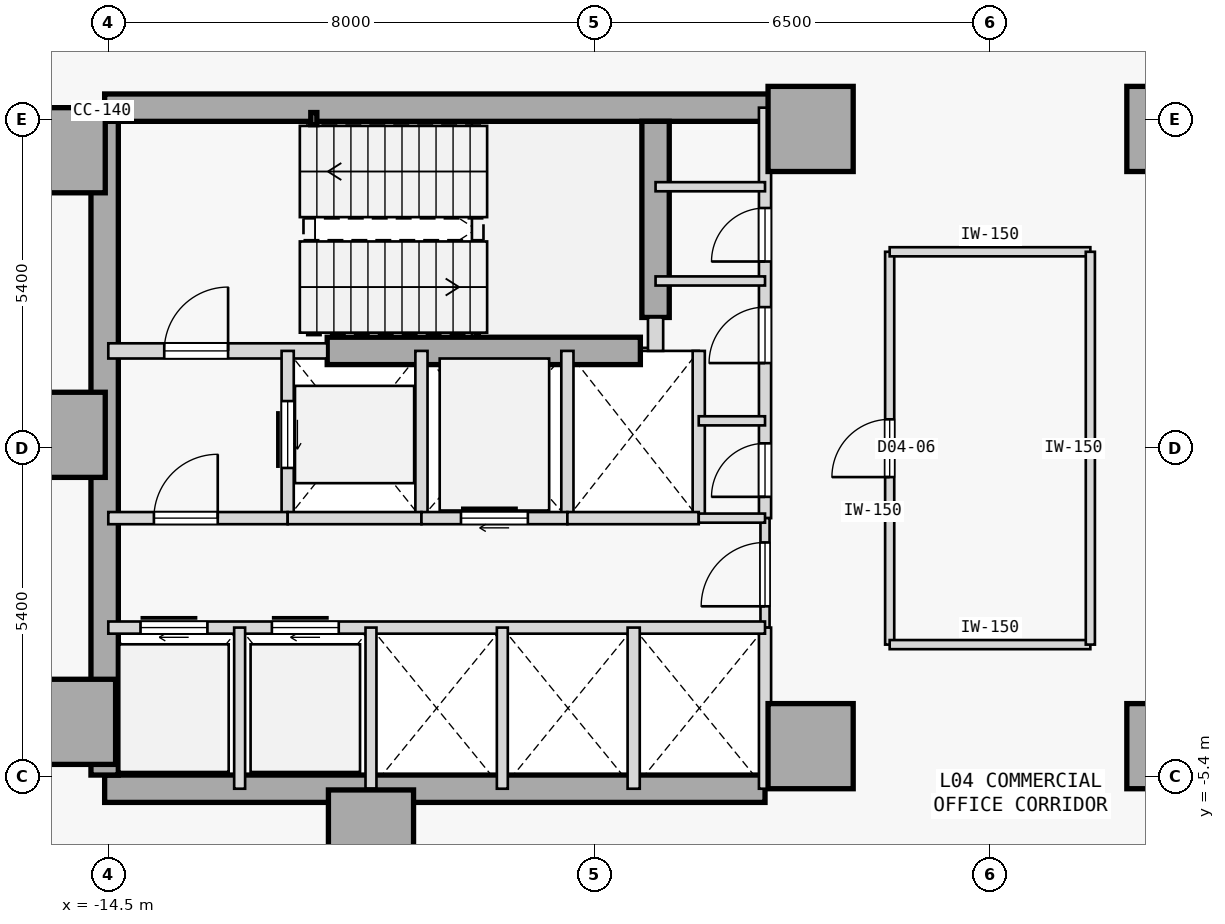
"""IFC4 building model, lengths in metres.
Left out: names, types, materials, properties, quantities, classifications, styles, units other than length and angle.
Written with IfcOpenShell. Run it as: python <this file> out.ifc"""

import sys

from ifc_helpers import new_model, si_unit, direction, frame, frame_2d, origin, origin_2d, place, context, subcontext, project, spatial, rectangle, hollow_rectangle, extrude, element, fill, save


model = new_model("IFC4")
c1 = context("Model", 3, precision=1e-05, world=origin(), true_north=direction((0.0, 1.0)))
c2 = subcontext(c1, "Body", "Model", "MODEL_VIEW")
j1 = project(units=[si_unit("LENGTHUNIT", "METRE"), si_unit("PLANEANGLEUNIT", "RADIAN")], contexts=[c1])
p1 = place(None, origin())
s1 = spatial("IfcSite", under=j1, at=p1, CompositionType="ELEMENT")
p2 = place(p1, origin())
s2 = spatial("IfcBuilding", under=s1, at=p2, CompositionType="ELEMENT")
p3 = place(p2, frame((0.0, 0.0, 21.8)))
s3 = spatial("IfcBuildingStorey", under=s2, at=p3, CompositionType="ELEMENT", Elevation=21.8)
for number, where, z_axis, x_axis in (
    (1, (-15.25, 4.9, 0.0), (0.0, 0.0, 1.0), (1.0, 0.0, 0.0)),
    (2, (-15.25, 0.22, 0.0), (0.0, 0.0, 1.0), (1.0, 0.0, 0.0)),
    (3, (-15.08, -4.5, 0.0), (0.0, 0.0, 1.0), (1.0, 0.0, 0.0)),
    (4, (-10.18, -6.32, 0.0), (0.0, 0.0, 1.0), (1.0, 0.0, 0.0)),
    (5, (-2.95, -4.9, 0.0), (0.0, 0.0, 1.0), (1.0, 0.0, 0.0)),
    (6, (-2.95, 5.25, 0.0), (0.0, 0.0, 1.0), (1.0, 0.0, 0.0)),
    (7, (2.95, -4.9, 0.0), (0.0, 0.0, 1.0), (1.0, 0.0, 0.0)),
    (8, (2.95, 5.25, 0.0), (0.0, 0.0, 1.0), (1.0, 0.0, 0.0)),
):
    element("IfcColumn", number, at=place(p3, frame(where, z_axis=z_axis, x_axis=x_axis)), inside=s3, PredefinedType="COLUMN", context=c2, shape_type="SweptSolid", body=[
        extrude(rectangle(XDim=1.4, YDim=1.4, at=origin_2d()), origin(), (0.0, 0.0, 1.0), 3.8),
    ])
p4 = place(p3, frame((-14.56, 5.6, 0.0), z_axis=(0.0, 0.0, 1.0), x_axis=(1.0, 0.0, 0.0)))
e9 = element("IfcWall", 9, at=p4, inside=s3, PredefinedType="SHEAR", context=c2, shape_type="SweptSolid", body=[
    extrude(rectangle(XDim=11.41, YDim=0.45, at=frame_2d((5.705, 0.0))), origin(), (0.0, 0.0, 1.0), 3.575),
])
p5 = place(p3, frame((-14.56, -5.6, 0.0), z_axis=(0.0, 0.0, 1.0), x_axis=(1.0, 0.0, 0.0)))
e10 = element("IfcWall", 10, at=p5, inside=s3, PredefinedType="SHEAR", context=c2, shape_type="SweptSolid", body=[
    extrude(rectangle(XDim=10.86, YDim=0.45, at=frame_2d((5.43, 0.0))), origin(), (0.0, 0.0, 1.0), 3.575),
])
p6 = place(p3, frame((-14.56, -5.375, 0.0), z_axis=(0.0, 0.0, 1.0), x_axis=(0.0, 1.0, 0.0)))
e11 = element("IfcWall", 11, at=p6, inside=s3, PredefinedType="SHEAR", context=c2, shape_type="SweptSolid", body=[
    extrude(rectangle(XDim=10.75, YDim=0.45, at=frame_2d((5.375, 0.0))), origin(), (0.0, 0.0, 1.0), 3.575),
])
p7 = place(p3, frame((-5.5, 2.15, 0.0), z_axis=(0.0, 0.0, 1.0), x_axis=(0.0, 1.0, 0.0)))
e12 = element("IfcWall", 12, at=p7, inside=s3, PredefinedType="SHEAR", context=c2, shape_type="SweptSolid", body=[
    extrude(rectangle(XDim=3.225, YDim=0.45, at=frame_2d((1.613, 0.0))), origin(), (0.0, 0.0, 1.0), 3.575),
])
p8 = place(p3, frame((-10.9, 1.6, 0.0), z_axis=(0.0, 0.0, 1.0), x_axis=(1.0, 0.0, 0.0)))
e13 = element("IfcWall", 13, at=p8, inside=s3, PredefinedType="SHEAR", context=c2, shape_type="SweptSolid", body=[
    extrude(rectangle(XDim=5.15, YDim=0.45, at=frame_2d((2.575, 0.0))), origin(), (0.0, 0.0, 1.0), 3.575),
])
p9 = place(p3, frame((-11.12, 5.42, 0.0), z_axis=(0.0, 0.0, 1.0), x_axis=(1.0, 0.0, 0.0)))
e14 = element("IfcColumn", 14, at=p9, inside=s3, PredefinedType="COLUMN", context=c2, shape_type="SweptSolid", body=[
    extrude(hollow_rectangle(XDim=0.1, YDim=0.2, WallThickness=0.008, at=origin_2d()), origin(), (0.0, 0.0, 1.0), 3.8),
])
p10 = place(p3, frame((-14.5, 1.6, 0.0), z_axis=(0.0, 0.0, 1.0), x_axis=(1.0, 0.0, 0.0)))
e15 = element("IfcWall", 15, at=p10, inside=s3, PredefinedType="STANDARD", context=c2, shape_type="SweptSolid", body=[
    extrude(rectangle(XDim=3.6, YDim=0.25, at=frame_2d((1.8, 0.0))), origin(), (0.0, 0.0, 1.0), 3.575),
])
p11 = place(p10, frame((0.92, 0.0, 0.0)))
e16 = element("IfcOpeningElement", 16, at=p11, cuts=e15, PredefinedType="OPENING", context=c2, shape_type="SweptSolid", body=[
    extrude(rectangle(XDim=1.05, YDim=2.15, at=frame_2d((0.525, 1.075))), frame((0.0, 0.135, 0.0), z_axis=(0.0, -1.0, 0.0), x_axis=(1.0, 0.0, 0.0)), (0.0, 0.0, 1.0), 0.27),
])
p12 = place(p3, frame((-5.5, 1.6, 0.0), z_axis=(0.0, 0.0, 1.0), x_axis=(0.0, 1.0, 0.0)))
e17 = element("IfcWall", 17, at=p12, inside=s3, PredefinedType="STANDARD", context=c2, shape_type="SweptSolid", body=[
    extrude(rectangle(XDim=0.55, YDim=0.25, at=frame_2d((0.275, 0.0))), origin(), (0.0, 0.0, 1.0), 3.575),
])
p13 = place(p3, frame((-3.7, -1.15, 0.0), z_axis=(0.0, 0.0, 1.0), x_axis=(0.0, 1.0, 0.0)))
e18 = element("IfcWall", 18, at=p13, inside=s3, PredefinedType="STANDARD", context=c2, shape_type="SweptSolid", body=[
    extrude(rectangle(XDim=6.75, YDim=0.2, at=frame_2d((3.375, 0.0))), origin(), (0.0, 0.0, 1.0), 3.575),
])
p14 = place(p13, frame((0.35, 0.0, 0.0)))
e19 = element("IfcOpeningElement", 19, at=p14, cuts=e18, PredefinedType="OPENING", context=c2, shape_type="SweptSolid", body=[
    extrude(rectangle(XDim=0.88, YDim=2.15, at=frame_2d((0.44, 1.075))), frame((0.0, 0.11, 0.0), z_axis=(0.0, -1.0, 0.0), x_axis=(1.0, 0.0, 0.0)), (0.0, 0.0, 1.0), 0.22),
])
p15 = place(p13, frame((2.55, 0.0, 0.0)))
e20 = element("IfcOpeningElement", 20, at=p15, cuts=e18, PredefinedType="OPENING", context=c2, shape_type="SweptSolid", body=[
    extrude(rectangle(XDim=0.92, YDim=2.15, at=frame_2d((0.46, 1.075))), frame((0.0, 0.11, 0.0), z_axis=(0.0, -1.0, 0.0), x_axis=(1.0, 0.0, 0.0)), (0.0, 0.0, 1.0), 0.22),
])
p16 = place(p13, frame((4.22, 0.0, 0.0)))
e21 = element("IfcOpeningElement", 21, at=p16, cuts=e18, PredefinedType="OPENING", context=c2, shape_type="SweptSolid", body=[
    extrude(rectangle(XDim=0.88, YDim=2.15, at=frame_2d((0.44, 1.075))), frame((0.0, 0.11, 0.0), z_axis=(0.0, -1.0, 0.0), x_axis=(1.0, 0.0, 0.0)), (0.0, 0.0, 1.0), 0.22),
])
p17 = place(p3, frame((-3.7, -2.95, 0.0), z_axis=(0.0, 0.0, 1.0), x_axis=(0.0, 1.0, 0.0)))
e22 = element("IfcWall", 22, at=p17, inside=s3, PredefinedType="PARTITIONING", context=c2, shape_type="SweptSolid", body=[
    extrude(rectangle(XDim=1.8, YDim=0.15, at=frame_2d((0.9, 0.0))), origin(), (0.0, 0.0, 1.0), 3.575),
])
p18 = place(p17, frame((0.35, 0.0, 0.0)))
e23 = element("IfcOpeningElement", 23, at=p18, cuts=e22, PredefinedType="OPENING", context=c2, shape_type="SweptSolid", body=[
    extrude(rectangle(XDim=1.05, YDim=2.18, at=frame_2d((0.525, 1.09))), frame((0.0, 0.085, 0.0), z_axis=(0.0, -1.0, 0.0), x_axis=(1.0, 0.0, 0.0)), (0.0, 0.0, 1.0), 0.17),
])
p19 = place(p3, frame((-3.7, -5.6, 0.0), z_axis=(0.0, 0.0, 1.0), x_axis=(0.0, 1.0, 0.0)))
e24 = element("IfcWall", 24, at=p19, inside=s3, PredefinedType="STANDARD", context=c2, shape_type="SweptSolid", body=[
    extrude(rectangle(XDim=2.65, YDim=0.2, at=frame_2d((1.325, 0.0))), origin(), (0.0, 0.0, 1.0), 3.575),
])
p20 = place(p3, frame((-11.55, -1.15, 0.0), z_axis=(0.0, 0.0, 1.0), x_axis=(0.0, 1.0, 0.0)))
e25 = element("IfcWall", 25, at=p20, inside=s3, PredefinedType="STANDARD", context=c2, shape_type="SweptSolid", body=[
    extrude(rectangle(XDim=2.75, YDim=0.2, at=frame_2d((1.375, 0.0))), origin(), (0.0, 0.0, 1.0), 3.575),
])
p21 = place(p20, frame((0.825, 0.0, 0.0)))
e26 = element("IfcOpeningElement", 26, at=p21, cuts=e25, PredefinedType="OPENING", context=c2, shape_type="SweptSolid", body=[
    extrude(rectangle(XDim=1.1, YDim=2.15, at=frame_2d((0.55, 1.075))), frame((0.0, 0.11, 0.0), z_axis=(0.0, -1.0, 0.0), x_axis=(1.0, 0.0, 0.0)), (0.0, 0.0, 1.0), 0.22),
])
p22 = place(p3, frame((-9.35, -1.15, 0.0), z_axis=(0.0, 0.0, 1.0), x_axis=(0.0, 1.0, 0.0)))
e27 = element("IfcWall", 27, at=p22, inside=s3, PredefinedType="STANDARD", context=c2, shape_type="SweptSolid", body=[
    extrude(rectangle(XDim=2.75, YDim=0.2, at=frame_2d((1.375, 0.0))), origin(), (0.0, 0.0, 1.0), 3.575),
])
p23 = place(p3, frame((-14.5, -1.15, 0.0), z_axis=(0.0, 0.0, 1.0), x_axis=(1.0, 0.0, 0.0)))
e28 = element("IfcWall", 28, at=p23, inside=s3, PredefinedType="STANDARD", context=c2, shape_type="SweptSolid", body=[
    extrude(rectangle(XDim=2.95, YDim=0.2, at=frame_2d((1.475, 0.0))), origin(), (0.0, 0.0, 1.0), 3.575),
])
p24 = place(p23, frame((0.75, 0.0, 0.0)))
e29 = element("IfcOpeningElement", 29, at=p24, cuts=e28, PredefinedType="OPENING", context=c2, shape_type="SweptSolid", body=[
    extrude(rectangle(XDim=1.05, YDim=2.18, at=frame_2d((0.525, 1.09))), frame((0.0, 0.11, 0.0), z_axis=(0.0, -1.0, 0.0), x_axis=(1.0, 0.0, 0.0)), (0.0, 0.0, 1.0), 0.22),
])
p25 = place(p3, frame((-11.55, -1.15, 0.0), z_axis=(0.0, 0.0, 1.0), x_axis=(1.0, 0.0, 0.0)))
e30 = element("IfcWall", 30, at=p25, inside=s3, PredefinedType="STANDARD", context=c2, shape_type="SweptSolid", body=[
    extrude(rectangle(XDim=2.2, YDim=0.2, at=frame_2d((1.1, 0.0))), origin(), (0.0, 0.0, 1.0), 3.575),
])
p26 = place(p3, frame((-6.95, -1.15, 0.0), z_axis=(0.0, 0.0, 1.0), x_axis=(0.0, 1.0, 0.0)))
e31 = element("IfcWall", 31, at=p26, inside=s3, PredefinedType="STANDARD", context=c2, shape_type="SweptSolid", body=[
    extrude(rectangle(XDim=2.75, YDim=0.2, at=frame_2d((1.375, 0.0))), origin(), (0.0, 0.0, 1.0), 3.575),
])
p27 = place(p3, frame((-9.35, -1.15, 0.0), z_axis=(0.0, 0.0, 1.0), x_axis=(1.0, 0.0, 0.0)))
e32 = element("IfcWall", 32, at=p27, inside=s3, PredefinedType="STANDARD", context=c2, shape_type="SweptSolid", body=[
    extrude(rectangle(XDim=2.4, YDim=0.2, at=frame_2d((1.2, 0.0))), origin(), (0.0, 0.0, 1.0), 3.575),
])
p28 = place(p27, frame((0.65, 0.0, 0.0)))
e33 = element("IfcOpeningElement", 33, at=p28, cuts=e32, PredefinedType="OPENING", context=c2, shape_type="SweptSolid", body=[
    extrude(rectangle(XDim=1.1, YDim=2.15, at=frame_2d((0.55, 1.075))), frame((0.0, 0.11, 0.0), z_axis=(0.0, -1.0, 0.0), x_axis=(1.0, 0.0, 0.0)), (0.0, 0.0, 1.0), 0.22),
])
p29 = place(p3, frame((-4.79, -1.15, 0.0), z_axis=(0.0, 0.0, 1.0), x_axis=(0.0, 1.0, 0.0)))
e34 = element("IfcWall", 34, at=p29, inside=s3, PredefinedType="STANDARD", context=c2, shape_type="SweptSolid", body=[
    extrude(rectangle(XDim=2.75, YDim=0.2, at=frame_2d((1.375, 0.0))), origin(), (0.0, 0.0, 1.0), 3.575),
])
p30 = place(p3, frame((-6.95, -1.15, 0.0), z_axis=(0.0, 0.0, 1.0), x_axis=(1.0, 0.0, 0.0)))
e35 = element("IfcWall", 35, at=p30, inside=s3, PredefinedType="STANDARD", context=c2, shape_type="SweptSolid", body=[
    extrude(rectangle(XDim=2.16, YDim=0.2, at=frame_2d((1.08, 0.0))), origin(), (0.0, 0.0, 1.0), 3.575),
])
p31 = place(p3, frame((-4.79, -1.15, 0.0), z_axis=(0.0, 0.0, 1.0), x_axis=(1.0, 0.0, 0.0)))
e36 = element("IfcWall", 36, at=p31, inside=s3, PredefinedType="PARTITIONING", context=c2, shape_type="SweptSolid", body=[
    extrude(rectangle(XDim=1.09, YDim=0.15, at=frame_2d((0.545, 0.0))), origin(), (0.0, 0.0, 1.0), 3.575),
])
p32 = place(p3, frame((-14.5, -2.95, 0.0), z_axis=(0.0, 0.0, 1.0), x_axis=(1.0, 0.0, 0.0)))
e37 = element("IfcWall", 37, at=p32, inside=s3, PredefinedType="STANDARD", context=c2, shape_type="SweptSolid", body=[
    extrude(rectangle(XDim=10.8, YDim=0.2, at=frame_2d((5.4, 0.0))), origin(), (0.0, 0.0, 1.0), 3.575),
])
p33 = place(p32, frame((0.53, 0.0, 0.0)))
e38 = element("IfcOpeningElement", 38, at=p33, cuts=e37, PredefinedType="OPENING", context=c2, shape_type="SweptSolid", body=[
    extrude(rectangle(XDim=1.1, YDim=2.15, at=frame_2d((0.55, 1.075))), frame((0.0, 0.11, 0.0), z_axis=(0.0, -1.0, 0.0), x_axis=(1.0, 0.0, 0.0)), (0.0, 0.0, 1.0), 0.22),
])
p34 = place(p32, frame((2.69, 0.0, 0.0)))
e39 = element("IfcOpeningElement", 39, at=p34, cuts=e37, PredefinedType="OPENING", context=c2, shape_type="SweptSolid", body=[
    extrude(rectangle(XDim=1.1, YDim=2.15, at=frame_2d((0.55, 1.075))), frame((0.0, 0.11, 0.0), z_axis=(0.0, -1.0, 0.0), x_axis=(1.0, 0.0, 0.0)), (0.0, 0.0, 1.0), 0.22),
])
p35 = place(p3, frame((-5.86, -5.6, 0.0), z_axis=(0.0, 0.0, 1.0), x_axis=(0.0, 1.0, 0.0)))
e40 = element("IfcWall", 40, at=p35, inside=s3, PredefinedType="STANDARD", context=c2, shape_type="SweptSolid", body=[
    extrude(rectangle(XDim=2.65, YDim=0.2, at=frame_2d((1.325, 0.0))), origin(), (0.0, 0.0, 1.0), 3.575),
])
for number, where, z_axis, x_axis in (
    (41, (-12.34, -5.6, 0.0), (0.0, 0.0, 1.0), (0.0, 1.0, 0.0)),
    (42, (-10.18, -5.6, 0.0), (0.0, 0.0, 1.0), (0.0, 1.0, 0.0)),
    (43, (-8.02, -5.6, 0.0), (0.0, 0.0, 1.0), (0.0, 1.0, 0.0)),
):
    element("IfcWall", number, at=place(p3, frame(where, z_axis=z_axis, x_axis=x_axis)), inside=s3, PredefinedType="STANDARD", context=c2, shape_type="SweptSolid", body=[
        extrude(rectangle(XDim=2.65, YDim=0.18, at=frame_2d((1.325, 0.0))), origin(), (0.0, 0.0, 1.0), 3.575),
    ])
p36 = place(p3, frame((-5.5, 4.3, 0.0), z_axis=(0.0, 0.0, 1.0), x_axis=(1.0, 0.0, 0.0)))
e44 = element("IfcWall", 44, at=p36, inside=s3, PredefinedType="PARTITIONING", context=c2, shape_type="SweptSolid", body=[
    extrude(rectangle(XDim=1.8, YDim=0.15, at=frame_2d((0.9, 0.0))), origin(), (0.0, 0.0, 1.0), 3.575),
])
p37 = place(p3, frame((-4.79, 0.45, 0.0), z_axis=(0.0, 0.0, 1.0), x_axis=(1.0, 0.0, 0.0)))
e45 = element("IfcWall", 45, at=p37, inside=s3, PredefinedType="PARTITIONING", context=c2, shape_type="SweptSolid", body=[
    extrude(rectangle(XDim=1.09, YDim=0.15, at=frame_2d((0.545, 0.0))), origin(), (0.0, 0.0, 1.0), 3.575),
])
p38 = place(p3, frame((-5.5, 2.75, 0.0), z_axis=(0.0, 0.0, 1.0), x_axis=(1.0, 0.0, 0.0)))
e46 = element("IfcWall", 46, at=p38, inside=s3, PredefinedType="PARTITIONING", context=c2, shape_type="SweptSolid", body=[
    extrude(rectangle(XDim=1.8, YDim=0.15, at=frame_2d((0.9, 0.0))), origin(), (0.0, 0.0, 1.0), 3.575),
])
p39 = place(p3, frame((-1.65, -3.23, 0.0), z_axis=(0.0, 0.0, 1.0), x_axis=(0.0, 1.0, 0.0)))
e47 = element("IfcWall", 47, at=p39, inside=s3, PredefinedType="PARTITIONING", context=c2, shape_type="SweptSolid", body=[
    extrude(rectangle(XDim=6.46, YDim=0.15, at=frame_2d((3.23, 0.0))), origin(), (0.0, 0.0, 1.0), 3.575),
])
p40 = place(p39, frame((2.755, 0.0, 0.0)))
e48 = element("IfcOpeningElement", 48, at=p40, cuts=e47, PredefinedType="OPENING", context=c2, shape_type="SweptSolid", body=[
    extrude(rectangle(XDim=0.95, YDim=2.15, at=frame_2d((0.475, 1.075))), frame((0.0, 0.085, 0.0), z_axis=(0.0, -1.0, 0.0), x_axis=(1.0, 0.0, 0.0)), (0.0, 0.0, 1.0), 0.17),
])
for number, where, z_axis, x_axis in (
    (49, (-1.65, -3.23, 0.0), (0.0, 0.0, 1.0), (1.0, 0.0, 0.0)),
    (50, (-1.65, 3.23, 0.0), (0.0, 0.0, 1.0), (1.0, 0.0, 0.0)),
):
    element("IfcWall", number, at=place(p3, frame(where, z_axis=z_axis, x_axis=x_axis)), inside=s3, PredefinedType="PARTITIONING", context=c2, shape_type="SweptSolid", body=[
        extrude(rectangle(XDim=3.3, YDim=0.15, at=frame_2d((1.65, 0.0))), origin(), (0.0, 0.0, 1.0), 3.575),
    ])
p41 = place(p3, frame((1.65, -3.23, 0.0), z_axis=(0.0, 0.0, 1.0), x_axis=(0.0, 1.0, 0.0)))
e51 = element("IfcWall", 51, at=p41, inside=s3, PredefinedType="PARTITIONING", context=c2, shape_type="SweptSolid", body=[
    extrude(rectangle(XDim=6.46, YDim=0.15, at=frame_2d((3.23, 0.0))), origin(), (0.0, 0.0, 1.0), 3.575),
])
p42 = place(p11, origin())
e52 = element("IfcDoor", 52, at=p42, inside=s3, OperationType="SINGLE_SWING_RIGHT", PredefinedType="DOOR", context=c2, shape_type="SweptSolid", body=[
    extrude(rectangle(XDim=1.05, YDim=2.15, at=frame_2d((0.525, 1.075))), frame((0.0, 0.025, 0.0), z_axis=(0.0, -1.0, 0.0), x_axis=(1.0, 0.0, 0.0)), (0.0, 0.0, 1.0), 0.05),
])
fill(e16, e52)
p43 = place(p24, origin())
e53 = element("IfcDoor", 53, at=p43, inside=s3, OperationType="SINGLE_SWING_RIGHT", PredefinedType="DOOR", context=c2, shape_type="SweptSolid", body=[
    extrude(rectangle(XDim=1.05, YDim=2.18, at=frame_2d((0.525, 1.09))), frame((0.0, 0.025, 0.0), z_axis=(0.0, -1.0, 0.0), x_axis=(1.0, 0.0, 0.0)), (0.0, 0.0, 1.0), 0.05),
])
fill(e29, e53)
p44 = place(p18, origin())
e54 = element("IfcDoor", 54, at=p44, inside=s3, OperationType="SINGLE_SWING_LEFT", PredefinedType="DOOR", context=c2, shape_type="SweptSolid", body=[
    extrude(rectangle(XDim=1.05, YDim=2.18, at=frame_2d((0.525, 1.09))), frame((0.0, 0.025, 0.0), z_axis=(0.0, -1.0, 0.0), x_axis=(1.0, 0.0, 0.0)), (0.0, 0.0, 1.0), 0.05),
])
fill(e23, e54)
p45 = place(p21, origin())
e55 = element("IfcDoor", 55, at=p45, inside=s3, OperationType="SLIDING_TO_RIGHT", PredefinedType="DOOR", context=c2, shape_type="SweptSolid", body=[
    extrude(rectangle(XDim=1.1, YDim=2.15, at=frame_2d((0.55, 1.075))), frame((0.0, 0.025, 0.0), z_axis=(0.0, -1.0, 0.0), x_axis=(1.0, 0.0, 0.0)), (0.0, 0.0, 1.0), 0.05),
])
fill(e26, e55)
p46 = place(p28, origin())
e56 = element("IfcDoor", 56, at=p46, inside=s3, OperationType="SLIDING_TO_RIGHT", PredefinedType="DOOR", context=c2, shape_type="SweptSolid", body=[
    extrude(rectangle(XDim=1.1, YDim=2.15, at=frame_2d((0.55, 1.075))), frame((0.0, 0.025, 0.0), z_axis=(0.0, -1.0, 0.0), x_axis=(1.0, 0.0, 0.0)), (0.0, 0.0, 1.0), 0.05),
])
fill(e33, e56)
p47 = place(p33, origin())
e57 = element("IfcDoor", 57, at=p47, inside=s3, OperationType="SLIDING_TO_RIGHT", PredefinedType="DOOR", context=c2, shape_type="SweptSolid", body=[
    extrude(rectangle(XDim=1.1, YDim=2.15, at=frame_2d((0.55, 1.075))), frame((0.0, 0.025, 0.0), z_axis=(0.0, -1.0, 0.0), x_axis=(1.0, 0.0, 0.0)), (0.0, 0.0, 1.0), 0.05),
])
fill(e38, e57)
p48 = place(p34, origin())
e58 = element("IfcDoor", 58, at=p48, inside=s3, OperationType="SLIDING_TO_RIGHT", PredefinedType="DOOR", context=c2, shape_type="SweptSolid", body=[
    extrude(rectangle(XDim=1.1, YDim=2.15, at=frame_2d((0.55, 1.075))), frame((0.0, 0.025, 0.0), z_axis=(0.0, -1.0, 0.0), x_axis=(1.0, 0.0, 0.0)), (0.0, 0.0, 1.0), 0.05),
])
fill(e39, e58)
p49 = place(p14, origin())
e59 = element("IfcDoor", 59, at=p49, inside=s3, OperationType="SINGLE_SWING_LEFT", PredefinedType="DOOR", context=c2, shape_type="SweptSolid", body=[
    extrude(rectangle(XDim=0.88, YDim=2.15, at=frame_2d((0.44, 1.075))), frame((0.0, 0.025, 0.0), z_axis=(0.0, -1.0, 0.0), x_axis=(1.0, 0.0, 0.0)), (0.0, 0.0, 1.0), 0.05),
])
fill(e19, e59)
p50 = place(p15, origin())
e60 = element("IfcDoor", 60, at=p50, inside=s3, OperationType="SINGLE_SWING_LEFT", PredefinedType="DOOR", context=c2, shape_type="SweptSolid", body=[
    extrude(rectangle(XDim=0.92, YDim=2.15, at=frame_2d((0.46, 1.075))), frame((0.0, 0.025, 0.0), z_axis=(0.0, -1.0, 0.0), x_axis=(1.0, 0.0, 0.0)), (0.0, 0.0, 1.0), 0.05),
])
fill(e20, e60)
p51 = place(p16, origin())
e61 = element("IfcDoor", 61, at=p51, inside=s3, OperationType="SINGLE_SWING_LEFT", PredefinedType="DOOR", context=c2, shape_type="SweptSolid", body=[
    extrude(rectangle(XDim=0.88, YDim=2.15, at=frame_2d((0.44, 1.075))), frame((0.0, 0.025, 0.0), z_axis=(0.0, -1.0, 0.0), x_axis=(1.0, 0.0, 0.0)), (0.0, 0.0, 1.0), 0.05),
])
fill(e21, e61)
p52 = place(p40, origin())
e62 = element("IfcDoor", 62, at=p52, inside=s3, OperationType="SINGLE_SWING_LEFT", PredefinedType="DOOR", context=c2, shape_type="SweptSolid", body=[
    extrude(rectangle(XDim=0.95, YDim=2.15, at=frame_2d((0.475, 1.075))), frame((0.0, 0.025, 0.0), z_axis=(0.0, -1.0, 0.0), x_axis=(1.0, 0.0, 0.0)), (0.0, 0.0, 1.0), 0.05),
])
fill(e48, e62)
save(model, sys.argv[1])
